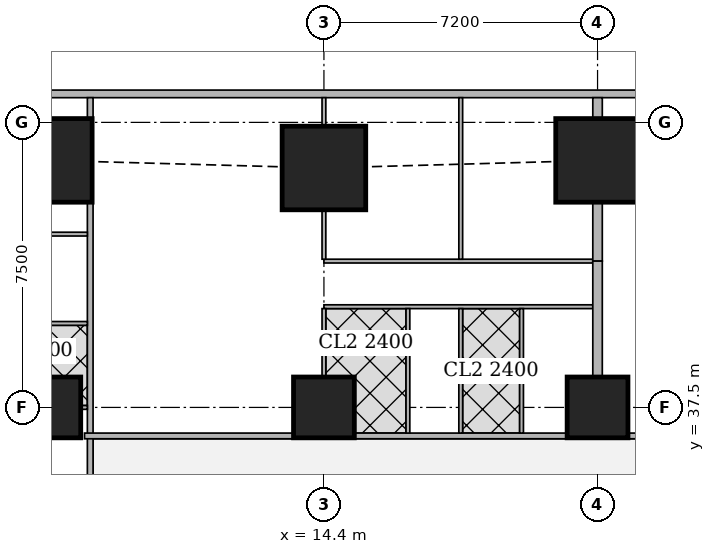
"""IFC4 building model, lengths in metres.
Left out: names, types, materials, properties, quantities, classifications, styles, units other than length and angle.
Written with IfcOpenShell. Run it as: python <this file> out.ifc"""

import sys

from ifc_helpers import new_model, si_unit, direction, frame, frame_2d, origin, origin_2d, place, context, subcontext, project, spatial, rectangle, extrude, element, fill, save


model = new_model("IFC4")
c1 = context("Model", 3, precision=1e-05, world=origin(), true_north=direction((0.0, 1.0)))
c2 = subcontext(c1, "Body", "Model", "MODEL_VIEW")
j1 = project(units=[si_unit("LENGTHUNIT", "METRE"), si_unit("PLANEANGLEUNIT", "RADIAN")], contexts=[c1])
p1 = place(None, origin())
s1 = spatial("IfcSite", under=j1, at=p1, CompositionType="ELEMENT")
p2 = place(p1, origin())
s2 = spatial("IfcBuilding", under=s1, at=p2, CompositionType="ELEMENT")
p3 = place(p2, frame((0.0, 0.0, 100.4)))
s3 = spatial("IfcBuildingStorey", under=s2, at=p3, CompositionType="ELEMENT", Elevation=100.4)
for number, where, z_axis, x_axis in (
    (1, (7.2, 37.5, 0.0), (0.0, 0.0, 1.0), (1.0, 0.0, 0.0)),
    (2, (14.4, 37.5, 0.0), (0.0, 0.0, 1.0), (1.0, 0.0, 0.0)),
    (3, (21.6, 37.5, 0.0), (0.0, 0.0, 1.0), (1.0, 0.0, 0.0)),
):
    element("IfcColumn", number, at=place(p3, frame(where, z_axis=z_axis, x_axis=x_axis)), inside=s3, PredefinedType="COLUMN", context=c2, shape_type="SweptSolid", body=[
        extrude(rectangle(XDim=1.6, YDim=1.6, at=origin_2d()), origin(), (0.0, 0.0, 1.0), 3.75),
    ])
for number, where, z_axis, x_axis in (
    (4, (7.2, 44.0, 0.0), (0.0, 0.0, 1.0), (1.0, 0.0, 0.0)),
    (5, (14.4, 43.8, 0.0), (0.0, 0.0, 1.0), (1.0, 0.0, 0.0)),
    (6, (21.6, 44.0, 0.0), (0.0, 0.0, 1.0), (1.0, 0.0, 0.0)),
):
    element("IfcColumn", number, at=place(p3, frame(where, z_axis=z_axis, x_axis=x_axis)), inside=s3, PredefinedType="COLUMN", context=c2, shape_type="SweptSolid", body=[
        extrude(rectangle(XDim=2.2, YDim=2.2, at=origin_2d()), origin(), (0.0, 0.0, 1.0), 3.75),
    ])
p4 = place(p3, frame((40.106, 45.75, 0.0), z_axis=(0.0, 0.0, 1.0), x_axis=(-1.0, 0.0, 0.0)))
e7 = element("IfcWall", 7, at=p4, inside=s3, PredefinedType="SOLIDWALL", context=c2, shape_type="SweptSolid", body=[
    extrude(rectangle(XDim=37.943, YDim=0.2, at=frame_2d((18.971, 0.0))), origin(), (0.0, 0.0, 1.0), 3.5),
])
p5 = place(p4, frame((8.606, 0.0, 0.9)))
e8 = element("IfcOpeningElement", 8, at=p5, cuts=e7, PredefinedType="OPENING", context=c2, shape_type="SweptSolid", body=[
    extrude(rectangle(XDim=1.8, YDim=1.5, at=frame_2d((0.9, 0.75))), frame((0.0, 0.11, 0.0), z_axis=(0.0, -1.0, 0.0), x_axis=(1.0, 0.0, 0.0)), (0.0, 0.0, 1.0), 0.22),
])
p6 = place(p4, frame((12.206, 0.0, 0.9)))
e9 = element("IfcOpeningElement", 9, at=p6, cuts=e7, PredefinedType="OPENING", context=c2, shape_type="SweptSolid", body=[
    extrude(rectangle(XDim=1.8, YDim=1.5, at=frame_2d((0.9, 0.75))), frame((0.0, 0.11, 0.0), z_axis=(0.0, -1.0, 0.0), x_axis=(1.0, 0.0, 0.0)), (0.0, 0.0, 1.0), 0.22),
])
p7 = place(p4, frame((15.806, 0.0, 0.9)))
e10 = element("IfcOpeningElement", 10, at=p7, cuts=e7, PredefinedType="OPENING", context=c2, shape_type="SweptSolid", body=[
    extrude(rectangle(XDim=1.8, YDim=1.5, at=frame_2d((0.9, 0.75))), frame((0.0, 0.11, 0.0), z_axis=(0.0, -1.0, 0.0), x_axis=(1.0, 0.0, 0.0)), (0.0, 0.0, 1.0), 0.22),
])
p8 = place(p4, frame((19.406, 0.0, 0.9)))
e11 = element("IfcOpeningElement", 11, at=p8, cuts=e7, PredefinedType="OPENING", context=c2, shape_type="SweptSolid", body=[
    extrude(rectangle(XDim=1.8, YDim=1.5, at=frame_2d((0.9, 0.75))), frame((0.0, 0.11, 0.0), z_axis=(0.0, -1.0, 0.0), x_axis=(1.0, 0.0, 0.0)), (0.0, 0.0, 1.0), 0.22),
])
p9 = place(p4, frame((23.006, 0.0, 0.9)))
e12 = element("IfcOpeningElement", 12, at=p9, cuts=e7, PredefinedType="OPENING", context=c2, shape_type="SweptSolid", body=[
    extrude(rectangle(XDim=1.8, YDim=1.5, at=frame_2d((0.9, 0.75))), frame((0.0, 0.11, 0.0), z_axis=(0.0, -1.0, 0.0), x_axis=(1.0, 0.0, 0.0)), (0.0, 0.0, 1.0), 0.22),
])
p10 = place(p4, frame((26.606, 0.0, 0.9)))
e13 = element("IfcOpeningElement", 13, at=p10, cuts=e7, PredefinedType="OPENING", context=c2, shape_type="SweptSolid", body=[
    extrude(rectangle(XDim=1.8, YDim=1.5, at=frame_2d((0.9, 0.75))), frame((0.0, 0.11, 0.0), z_axis=(0.0, -1.0, 0.0), x_axis=(1.0, 0.0, 0.0)), (0.0, 0.0, 1.0), 0.22),
])
p11 = place(p3, frame((8.25, 2.126, 0.0), z_axis=(0.0, 0.0, 1.0), x_axis=(0.0, 1.0, 0.0)))
e14 = element("IfcWall", 14, at=p11, inside=s3, PredefinedType="SOLIDWALL", context=c2, shape_type="SweptSolid", body=[
    extrude(rectangle(XDim=40.773, YDim=0.15, at=frame_2d((20.386, 0.0))), origin(), (0.0, 0.0, 1.0), 3.5),
])
p12 = place(p11, frame((10.286, 0.0, 0.0)))
e15 = element("IfcOpeningElement", 15, at=p12, cuts=e14, PredefinedType="OPENING", context=c2, shape_type="SweptSolid", body=[
    extrude(rectangle(XDim=1.0, YDim=2.1, at=frame_2d((0.5, 1.05))), frame((0.0, 0.085, 0.0), z_axis=(0.0, -1.0, 0.0), x_axis=(1.0, 0.0, 0.0)), (0.0, 0.0, 1.0), 0.17),
])
p13 = place(p11, frame((14.461, 0.0, 0.0)))
e16 = element("IfcOpeningElement", 16, at=p13, cuts=e14, PredefinedType="OPENING", context=c2, shape_type="SweptSolid", body=[
    extrude(rectangle(XDim=1.0, YDim=2.1, at=frame_2d((0.5, 1.05))), frame((0.0, 0.085, 0.0), z_axis=(0.0, -1.0, 0.0), x_axis=(1.0, 0.0, 0.0)), (0.0, 0.0, 1.0), 0.17),
])
p14 = place(p11, frame((25.287, 0.0, 0.0)))
e17 = element("IfcOpeningElement", 17, at=p14, cuts=e14, PredefinedType="OPENING", context=c2, shape_type="SweptSolid", body=[
    extrude(rectangle(XDim=1.0, YDim=2.1, at=frame_2d((0.5, 1.05))), frame((0.0, 0.085, 0.0), z_axis=(0.0, -1.0, 0.0), x_axis=(1.0, 0.0, 0.0)), (0.0, 0.0, 1.0), 0.17),
])
p15 = place(p11, frame((32.787, 0.0, 0.0)))
e18 = element("IfcOpeningElement", 18, at=p15, cuts=e14, PredefinedType="OPENING", context=c2, shape_type="SweptSolid", body=[
    extrude(rectangle(XDim=1.0, YDim=2.1, at=frame_2d((0.5, 1.05))), frame((0.0, 0.085, 0.0), z_axis=(0.0, -1.0, 0.0), x_axis=(1.0, 0.0, 0.0)), (0.0, 0.0, 1.0), 0.17),
])
p16 = place(p3, frame((8.25, 45.101, 0.0), z_axis=(0.0, 0.0, 1.0), x_axis=(0.0, 1.0, 0.0)))
e19 = element("IfcWall", 19, at=p16, inside=s3, PredefinedType="SOLIDWALL", context=c2, shape_type="SweptSolid", body=[
    extrude(rectangle(XDim=0.549, YDim=0.15, at=frame_2d((0.274, 0.0))), origin(), (0.0, 0.0, 1.0), 3.5),
])
p17 = place(p3, frame((8.1, 36.75, 0.0), z_axis=(0.0, 0.0, 1.0), x_axis=(1.0, 0.0, 0.0)))
e20 = element("IfcWall", 20, at=p17, inside=s3, PredefinedType="SOLIDWALL", context=c2, shape_type="SweptSolid", body=[
    extrude(rectangle(XDim=5.499, YDim=0.15, at=frame_2d((2.75, 0.0))), origin(), (0.0, 0.0, 1.0), 3.5),
])
p18 = place(p17, frame((2.725, 0.0, 0.0)))
e21 = element("IfcOpeningElement", 21, at=p18, cuts=e20, PredefinedType="OPENING", context=c2, shape_type="SweptSolid", body=[
    extrude(rectangle(XDim=1.0, YDim=2.1, at=frame_2d((0.5, 1.05))), frame((0.0, 0.085, 0.0), z_axis=(0.0, -1.0, 0.0), x_axis=(1.0, 0.0, 0.0)), (0.0, 0.0, 1.0), 0.17),
])
p19 = place(p3, frame((15.201, 36.75, 0.0), z_axis=(0.0, 0.0, 1.0), x_axis=(1.0, 0.0, 0.0)))
e22 = element("IfcWall", 22, at=p19, inside=s3, PredefinedType="SOLIDWALL", context=c2, shape_type="SweptSolid", body=[
    extrude(rectangle(XDim=5.598, YDim=0.15, at=frame_2d((2.799, 0.0))), origin(), (0.0, 0.0, 1.0), 3.5),
])
p20 = place(p3, frame((22.401, 36.75, 0.0), z_axis=(0.0, 0.0, 1.0), x_axis=(1.0, 0.0, 0.0)))
e23 = element("IfcWall", 23, at=p20, inside=s3, PredefinedType="SOLIDWALL", context=c2, shape_type="SweptSolid", body=[
    extrude(rectangle(XDim=5.598, YDim=0.15, at=frame_2d((2.799, 0.0))), origin(), (0.0, 0.0, 1.0), 3.5),
])
p21 = place(p20, frame((0.699, 0.0, 0.0)))
e24 = element("IfcOpeningElement", 24, at=p21, cuts=e23, PredefinedType="OPENING", context=c2, shape_type="SweptSolid", body=[
    extrude(rectangle(XDim=1.0, YDim=2.1, at=frame_2d((0.5, 1.05))), frame((0.0, 0.085, 0.0), z_axis=(0.0, -1.0, 0.0), x_axis=(1.0, 0.0, 0.0)), (0.0, 0.0, 1.0), 0.17),
])
p22 = place(p3, frame((8.001, 37.5, 0.0), z_axis=(0.0, 0.0, 1.0), x_axis=(1.0, 0.0, 0.0)))
e25 = element("IfcWall", 25, at=p22, inside=s3, PredefinedType="PARTITIONING", context=c2, shape_type="SweptSolid", body=[
    extrude(rectangle(XDim=0.174, YDim=0.1, at=frame_2d((0.087, 0.0))), origin(), (0.0, 0.0, 1.0), 3.5),
])
p23 = place(p3, frame((4.9, 39.71, 0.0), z_axis=(0.0, 0.0, 1.0), x_axis=(1.0, 0.0, 0.0)))
e26 = element("IfcWall", 26, at=p23, inside=s3, PredefinedType="PARTITIONING", context=c2, shape_type="SweptSolid", body=[
    extrude(rectangle(XDim=3.275, YDim=0.1, at=frame_2d((1.638, 0.0))), origin(), (0.0, 0.0, 1.0), 3.5),
])
p24 = place(p3, frame((14.4, 41.35, 0.0), z_axis=(0.0, 0.0, 1.0), x_axis=(1.0, 0.0, 0.0)))
e27 = element("IfcWall", 27, at=p24, inside=s3, PredefinedType="PARTITIONING", context=c2, shape_type="SweptSolid", body=[
    extrude(rectangle(XDim=7.075, YDim=0.1, at=frame_2d((3.538, 0.0))), origin(), (0.0, 0.0, 1.0), 3.5),
])
p25 = place(p24, frame((0.2, 0.0, 0.0)))
e28 = element("IfcOpeningElement", 28, at=p25, cuts=e27, PredefinedType="OPENING", context=c2, shape_type="SweptSolid", body=[
    extrude(rectangle(XDim=0.9, YDim=2.1, at=frame_2d((0.45, 1.05))), frame((0.0, 0.06, 0.0), z_axis=(0.0, -1.0, 0.0), x_axis=(1.0, 0.0, 0.0)), (0.0, 0.0, 1.0), 0.12),
])
p26 = place(p24, frame((3.8, 0.0, 0.0)))
e29 = element("IfcOpeningElement", 29, at=p26, cuts=e27, PredefinedType="OPENING", context=c2, shape_type="SweptSolid", body=[
    extrude(rectangle(XDim=0.9, YDim=2.1, at=frame_2d((0.45, 1.05))), frame((0.0, 0.06, 0.0), z_axis=(0.0, -1.0, 0.0), x_axis=(1.0, 0.0, 0.0)), (0.0, 0.0, 1.0), 0.12),
])
p27 = place(p3, frame((14.4, 40.15, 0.0), z_axis=(0.0, 0.0, 1.0), x_axis=(1.0, 0.0, 0.0)))
e30 = element("IfcWall", 30, at=p27, inside=s3, PredefinedType="PARTITIONING", context=c2, shape_type="SweptSolid", body=[
    extrude(rectangle(XDim=7.075, YDim=0.1, at=frame_2d((3.538, 0.0))), origin(), (0.0, 0.0, 1.0), 3.5),
])
p28 = place(p27, frame((0.655, 0.0, 0.0)))
e31 = element("IfcOpeningElement", 31, at=p28, cuts=e30, PredefinedType="OPENING", context=c2, shape_type="SweptSolid", body=[
    extrude(rectangle(XDim=0.9, YDim=2.1, at=frame_2d((0.45, 1.05))), frame((0.0, 0.06, 0.0), z_axis=(0.0, -1.0, 0.0), x_axis=(1.0, 0.0, 0.0)), (0.0, 0.0, 1.0), 0.12),
])
p29 = place(p27, frame((3.95, 0.0, 0.0)))
e32 = element("IfcOpeningElement", 32, at=p29, cuts=e30, PredefinedType="OPENING", context=c2, shape_type="SweptSolid", body=[
    extrude(rectangle(XDim=0.9, YDim=2.1, at=frame_2d((0.45, 1.05))), frame((0.0, 0.06, 0.0), z_axis=(0.0, -1.0, 0.0), x_axis=(1.0, 0.0, 0.0)), (0.0, 0.0, 1.0), 0.12),
])
p30 = place(p27, frame((2.455, 0.0, 0.0)))
e33 = element("IfcOpeningElement", 33, at=p30, cuts=e30, PredefinedType="OPENING", context=c2, shape_type="SweptSolid", body=[
    extrude(rectangle(XDim=0.9, YDim=2.1, at=frame_2d((0.45, 1.05))), frame((0.0, 0.06, 0.0), z_axis=(0.0, -1.0, 0.0), x_axis=(1.0, 0.0, 0.0)), (0.0, 0.0, 1.0), 0.12),
])
p31 = place(p27, frame((5.75, 0.0, 0.0)))
e34 = element("IfcOpeningElement", 34, at=p31, cuts=e30, PredefinedType="OPENING", context=c2, shape_type="SweptSolid", body=[
    extrude(rectangle(XDim=0.9, YDim=2.1, at=frame_2d((0.45, 1.05))), frame((0.0, 0.06, 0.0), z_axis=(0.0, -1.0, 0.0), x_axis=(1.0, 0.0, 0.0)), (0.0, 0.0, 1.0), 0.12),
])
p32 = place(p3, frame((14.4, 41.4, 0.0), z_axis=(0.0, 0.0, 1.0), x_axis=(0.0, 1.0, 0.0)))
e35 = element("IfcWall", 35, at=p32, inside=s3, PredefinedType="PARTITIONING", context=c2, shape_type="SweptSolid", body=[
    extrude(rectangle(XDim=1.299, YDim=0.1, at=frame_2d((0.649, 0.0))), origin(), (0.0, 0.0, 1.0), 3.5),
])
p33 = place(p3, frame((14.4, 44.901, 0.0), z_axis=(0.0, 0.0, 1.0), x_axis=(0.0, 1.0, 0.0)))
e36 = element("IfcWall", 36, at=p33, inside=s3, PredefinedType="PARTITIONING", context=c2, shape_type="SweptSolid", body=[
    extrude(rectangle(XDim=0.749, YDim=0.1, at=frame_2d((0.375, 0.0))), origin(), (0.0, 0.0, 1.0), 3.5),
])
p34 = place(p3, frame((18.0, 41.4, 0.0), z_axis=(0.0, 0.0, 1.0), x_axis=(0.0, 1.0, 0.0)))
e37 = element("IfcWall", 37, at=p34, inside=s3, PredefinedType="PARTITIONING", context=c2, shape_type="SweptSolid", body=[
    extrude(rectangle(XDim=4.25, YDim=0.1, at=frame_2d((2.125, 0.0))), origin(), (0.0, 0.0, 1.0), 2.2),
])
p35 = place(p3, frame((14.4, 38.301, 0.0), z_axis=(0.0, 0.0, 1.0), x_axis=(0.0, 1.0, 0.0)))
e38 = element("IfcWall", 38, at=p35, inside=s3, PredefinedType="PARTITIONING", context=c2, shape_type="SweptSolid", body=[
    extrude(rectangle(XDim=1.799, YDim=0.1, at=frame_2d((0.899, 0.0))), origin(), (0.0, 0.0, 1.0), 3.5),
])
for number, where, z_axis, x_axis in (
    (39, (18.0, 36.825, 0.0), (0.0, 0.0, 1.0), (0.0, 1.0, 0.0)),
    (40, (16.61, 36.825, 0.0), (0.0, 0.0, 1.0), (0.0, 1.0, 0.0)),
    (41, (19.6, 36.825, 0.0), (0.0, 0.0, 1.0), (0.0, 1.0, 0.0)),
):
    element("IfcWall", number, at=place(p3, frame(where, z_axis=z_axis, x_axis=x_axis)), inside=s3, PredefinedType="PARTITIONING", context=c2, shape_type="SweptSolid", body=[
        extrude(rectangle(XDim=3.275, YDim=0.1, at=frame_2d((1.638, 0.0))), origin(), (0.0, 0.0, 1.0), 3.5),
    ])
p36 = place(p3, frame((21.6, 41.35, 0.0), z_axis=(0.0, 0.0, 1.0), x_axis=(0.0, 1.0, 0.0)))
e42 = element("IfcWall", 42, at=p36, inside=s3, PredefinedType="SOLIDWALL", context=c2, shape_type="SweptSolid", body=[
    extrude(rectangle(XDim=1.549, YDim=0.25, at=frame_2d((0.774, 0.0))), origin(), (0.0, 0.0, 1.0), 3.5),
])
p37 = place(p3, frame((21.6, 45.101, 0.0), z_axis=(0.0, 0.0, 1.0), x_axis=(0.0, 1.0, 0.0)))
e43 = element("IfcWall", 43, at=p37, inside=s3, PredefinedType="SOLIDWALL", context=c2, shape_type="SweptSolid", body=[
    extrude(rectangle(XDim=0.549, YDim=0.25, at=frame_2d((0.274, 0.0))), origin(), (0.0, 0.0, 1.0), 3.5),
])
p38 = place(p3, frame((21.6, 38.301, 0.0), z_axis=(0.0, 0.0, 1.0), x_axis=(0.0, 1.0, 0.0)))
e44 = element("IfcWall", 44, at=p38, inside=s3, PredefinedType="SOLIDWALL", context=c2, shape_type="SweptSolid", body=[
    extrude(rectangle(XDim=3.049, YDim=0.25, at=frame_2d((1.524, 0.0))), origin(), (0.0, 0.0, 1.0), 3.5),
])
p39 = place(p3, frame((8.175, 42.06, 0.0), z_axis=(0.0, 0.0, 1.0), x_axis=(-1.0, 0.0, 0.0)))
e45 = element("IfcWall", 45, at=p39, inside=s3, PredefinedType="PARTITIONING", context=c2, shape_type="SweptSolid", body=[
    extrude(rectangle(XDim=3.275, YDim=0.1, at=frame_2d((1.638, 0.0))), origin(), (0.0, 0.0, 1.0), 3.5),
])
p40 = place(p39, frame((2.1, 0.0, 0.0)))
e46 = element("IfcOpeningElement", 46, at=p40, cuts=e45, PredefinedType="OPENING", context=c2, shape_type="SweptSolid", body=[
    extrude(rectangle(XDim=0.9, YDim=2.1, at=frame_2d((0.45, 1.05))), frame((0.0, 0.06, 0.0), z_axis=(0.0, -1.0, 0.0), x_axis=(1.0, 0.0, 0.0)), (0.0, 0.0, 1.0), 0.12),
])
p41 = place(p7, origin())
e47 = element("IfcWindow", 47, at=p41, inside=s3, PartitioningType="SINGLE_PANEL", PredefinedType="WINDOW", context=c2, shape_type="SweptSolid", body=[
    extrude(rectangle(XDim=1.8, YDim=1.5, at=frame_2d((0.9, 0.75))), frame((0.0, 0.03, 0.0), z_axis=(0.0, -1.0, 0.0), x_axis=(1.0, 0.0, 0.0)), (0.0, 0.0, 1.0), 0.06),
])
fill(e10, e47)
p42 = place(p8, origin())
e48 = element("IfcWindow", 48, at=p42, inside=s3, PartitioningType="SINGLE_PANEL", PredefinedType="WINDOW", context=c2, shape_type="SweptSolid", body=[
    extrude(rectangle(XDim=1.8, YDim=1.5, at=frame_2d((0.9, 0.75))), frame((0.0, 0.03, 0.0), z_axis=(0.0, -1.0, 0.0), x_axis=(1.0, 0.0, 0.0)), (0.0, 0.0, 1.0), 0.06),
])
fill(e11, e48)
p43 = place(p9, origin())
e49 = element("IfcWindow", 49, at=p43, inside=s3, PartitioningType="SINGLE_PANEL", PredefinedType="WINDOW", context=c2, shape_type="SweptSolid", body=[
    extrude(rectangle(XDim=1.8, YDim=1.5, at=frame_2d((0.9, 0.75))), frame((0.0, 0.03, 0.0), z_axis=(0.0, -1.0, 0.0), x_axis=(1.0, 0.0, 0.0)), (0.0, 0.0, 1.0), 0.06),
])
fill(e12, e49)
p44 = place(p10, origin())
e50 = element("IfcWindow", 50, at=p44, inside=s3, PartitioningType="SINGLE_PANEL", PredefinedType="WINDOW", context=c2, shape_type="SweptSolid", body=[
    extrude(rectangle(XDim=1.8, YDim=1.5, at=frame_2d((0.9, 0.75))), frame((0.0, 0.03, 0.0), z_axis=(0.0, -1.0, 0.0), x_axis=(1.0, 0.0, 0.0)), (0.0, 0.0, 1.0), 0.06),
])
fill(e13, e50)
p45 = place(p15, origin())
e51 = element("IfcDoor", 51, at=p45, inside=s3, OperationType="SINGLE_SWING_LEFT", PredefinedType="DOOR", context=c2, shape_type="SweptSolid", body=[
    extrude(rectangle(XDim=1.0, YDim=2.1, at=frame_2d((0.5, 1.05))), frame((0.0, 0.025, 0.0), z_axis=(0.0, -1.0, 0.0), x_axis=(1.0, 0.0, 0.0)), (0.0, 0.0, 1.0), 0.05),
])
fill(e18, e51)
p46 = place(p25, origin())
e52 = element("IfcDoor", 52, at=p46, inside=s3, OperationType="SINGLE_SWING_LEFT", PredefinedType="DOOR", context=c2, shape_type="SweptSolid", body=[
    extrude(rectangle(XDim=0.9, YDim=2.1, at=frame_2d((0.45, 1.05))), frame((0.0, 0.025, 0.0), z_axis=(0.0, -1.0, 0.0), x_axis=(1.0, 0.0, 0.0)), (0.0, 0.0, 1.0), 0.05),
])
fill(e28, e52)
p47 = place(p26, origin())
e53 = element("IfcDoor", 53, at=p47, inside=s3, OperationType="SINGLE_SWING_LEFT", PredefinedType="DOOR", context=c2, shape_type="SweptSolid", body=[
    extrude(rectangle(XDim=0.9, YDim=2.1, at=frame_2d((0.45, 1.05))), frame((0.0, 0.025, 0.0), z_axis=(0.0, -1.0, 0.0), x_axis=(1.0, 0.0, 0.0)), (0.0, 0.0, 1.0), 0.05),
])
fill(e29, e53)
p48 = place(p28, origin())
e54 = element("IfcDoor", 54, at=p48, inside=s3, OperationType="SINGLE_SWING_RIGHT", PredefinedType="DOOR", context=c2, shape_type="SweptSolid", body=[
    extrude(rectangle(XDim=0.9, YDim=2.1, at=frame_2d((0.45, 1.05))), frame((0.0, 0.025, 0.0), z_axis=(0.0, -1.0, 0.0), x_axis=(1.0, 0.0, 0.0)), (0.0, 0.0, 1.0), 0.05),
])
fill(e31, e54)
p49 = place(p29, origin())
e55 = element("IfcDoor", 55, at=p49, inside=s3, OperationType="SINGLE_SWING_LEFT", PredefinedType="DOOR", context=c2, shape_type="SweptSolid", body=[
    extrude(rectangle(XDim=0.9, YDim=2.1, at=frame_2d((0.45, 1.05))), frame((0.0, 0.025, 0.0), z_axis=(0.0, -1.0, 0.0), x_axis=(1.0, 0.0, 0.0)), (0.0, 0.0, 1.0), 0.05),
])
fill(e32, e55)
p50 = place(p30, origin())
e56 = element("IfcDoor", 56, at=p50, inside=s3, OperationType="SINGLE_SWING_LEFT", PredefinedType="DOOR", context=c2, shape_type="SweptSolid", body=[
    extrude(rectangle(XDim=0.9, YDim=2.1, at=frame_2d((0.45, 1.05))), frame((0.0, 0.025, 0.0), z_axis=(0.0, -1.0, 0.0), x_axis=(1.0, 0.0, 0.0)), (0.0, 0.0, 1.0), 0.05),
])
fill(e33, e56)
p51 = place(p31, origin())
e57 = element("IfcDoor", 57, at=p51, inside=s3, OperationType="SINGLE_SWING_LEFT", PredefinedType="DOOR", context=c2, shape_type="SweptSolid", body=[
    extrude(rectangle(XDim=0.9, YDim=2.1, at=frame_2d((0.45, 1.05))), frame((0.0, 0.025, 0.0), z_axis=(0.0, -1.0, 0.0), x_axis=(1.0, 0.0, 0.0)), (0.0, 0.0, 1.0), 0.05),
])
fill(e34, e57)
p52 = place(p18, origin())
e58 = element("IfcDoor", 58, at=p52, inside=s3, OperationType="SINGLE_SWING_LEFT", PredefinedType="DOOR", context=c2, shape_type="SweptSolid", body=[
    extrude(rectangle(XDim=1.0, YDim=2.1, at=frame_2d((0.5, 1.05))), frame((0.0, 0.025, 0.0), z_axis=(0.0, -1.0, 0.0), x_axis=(1.0, 0.0, 0.0)), (0.0, 0.0, 1.0), 0.05),
])
fill(e21, e58)
save(model, sys.argv[1])
